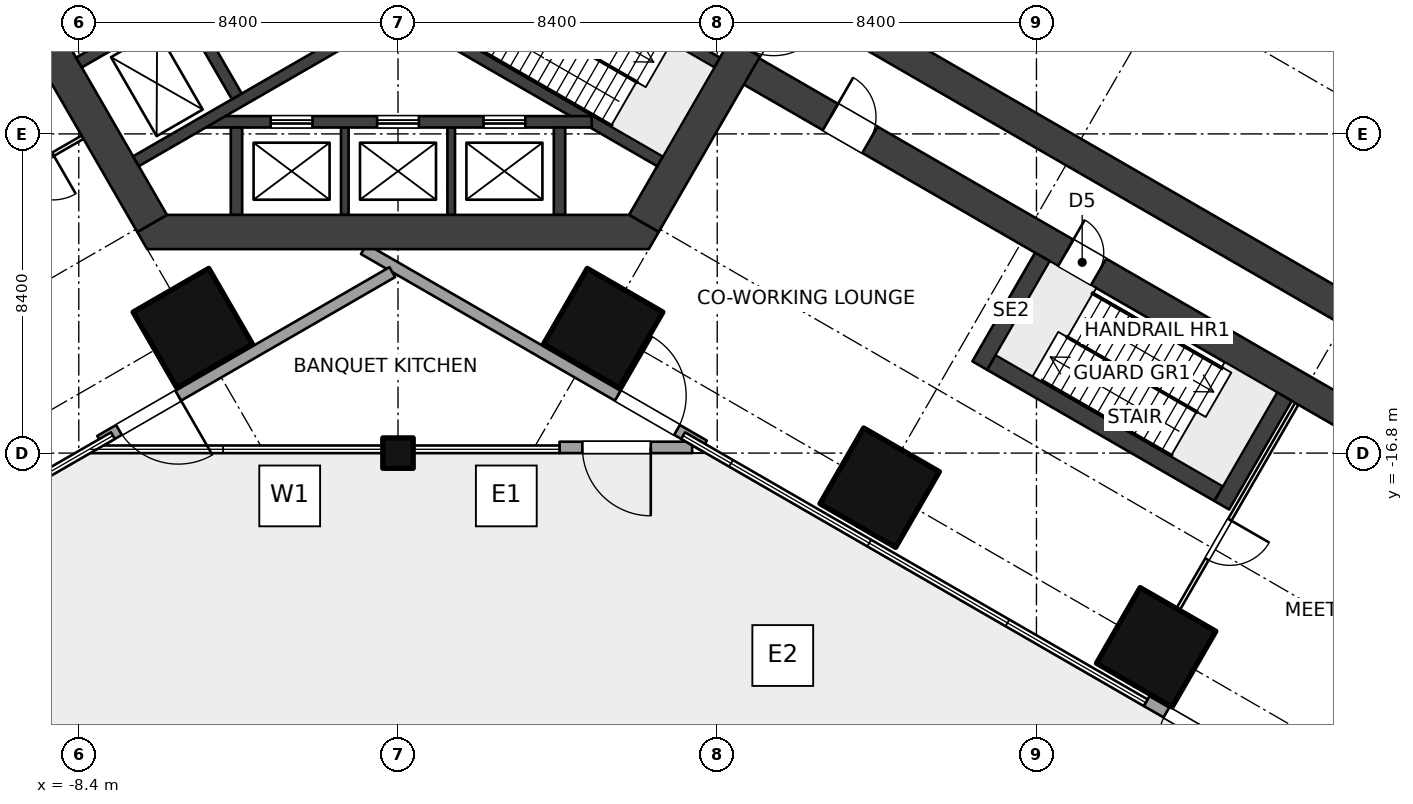
"""IFC4 building model, lengths in metres.
Left out: names, types, materials, properties, quantities, classifications, styles, units other than length and angle.
Written with IfcOpenShell. Run it as: python <this file> out.ifc"""

import sys

from ifc_helpers import new_model, si_unit, direction, frame, frame_2d, origin, origin_2d, place, context, subcontext, project, spatial, polyline, rectangle, outline, extrude, element, fill, save


model = new_model("IFC4")
c1 = context("Model", 3, precision=1e-05, world=origin(), true_north=direction((0.0, 1.0)))
c2 = subcontext(c1, "Body", "Model", "MODEL_VIEW")
j1 = project(units=[si_unit("LENGTHUNIT", "METRE"), si_unit("PLANEANGLEUNIT", "RADIAN")], contexts=[c1])
p1 = place(None, origin())
s1 = spatial("IfcSite", under=j1, at=p1, CompositionType="ELEMENT")
p2 = place(p1, origin())
s2 = spatial("IfcBuilding", under=s1, at=p2, CompositionType="ELEMENT")
p3 = place(p2, frame((0.0, 0.0, 16.0)))
s3 = spatial("IfcBuildingStorey", under=s2, at=p3, CompositionType="ELEMENT", Elevation=16.0)
for number, where, z_axis, x_axis in (
    (1, (-5.4, -13.51, 0.0), (0.0, 0.0, 1.0), (-0.5, 0.866, 0.0)),
    (2, (5.4, -13.51, 0.0), (0.0, 0.0, 1.0), (-0.5, -0.866, 0.0)),
    (3, (12.675, -17.71, 0.0), (0.0, 0.0, 1.0), (-0.5, -0.866, 0.0)),
    (4, (19.949, -21.91, 0.0), (0.0, 0.0, 1.0), (-0.5, -0.866, 0.0)),
):
    element("IfcColumn", number, at=place(p3, frame(where, z_axis=z_axis, x_axis=x_axis)), inside=s3, PredefinedType="COLUMN", context=c2, shape_type="SweptSolid", body=[
        extrude(rectangle(XDim=2.3, YDim=2.3, at=origin_2d()), origin(), (0.0, 0.0, 1.0), 5.0),
    ])
p4 = place(p3, frame((0.0, -16.8, 0.0), z_axis=(0.0, 0.0, 1.0), x_axis=(1.0, 0.0, 0.0)))
e5 = element("IfcColumn", 5, at=p4, inside=s3, PredefinedType="COLUMN", context=c2, shape_type="SweptSolid", body=[
    extrude(rectangle(XDim=0.8, YDim=0.8, at=origin_2d()), origin(), (0.0, 0.0, 1.0), 5.0),
])
p5 = place(p3, frame((-6.47, -10.757, 0.0), z_axis=(0.0, 0.0, 1.0), x_axis=(-0.499997612506, 0.8660267822, 0.0)))
e6 = element("IfcWall", 6, at=p5, inside=s3, PredefinedType="SHEAR", context=c2, shape_type="SweptSolid", body=[
    extrude(rectangle(XDim=12.161, YDim=0.9, at=frame_2d((6.08, 0.0))), origin(), (0.0, 0.0, 1.0), 5.0),
])
p6 = place(p5, frame((5.33, 0.0, 0.0)))
e7 = element("IfcOpeningElement", 7, at=p6, cuts=e6, PredefinedType="OPENING", context=c2, shape_type="SweptSolid", body=[
    extrude(rectangle(XDim=1.5, YDim=2.1, at=frame_2d((0.75, 1.05))), frame((0.0, 0.46, 0.0), z_axis=(0.0, -1.0, 0.0), x_axis=(1.0, 0.0, 0.0)), (0.0, 0.0, 1.0), 0.92),
])
p7 = place(p3, frame((12.551, -0.225, 0.0), z_axis=(0.0, 0.0, 1.0), x_axis=(-0.499997612506, -0.8660267822, 0.0)))
e8 = element("IfcWall", 8, at=p7, inside=s3, PredefinedType="SHEAR", context=c2, shape_type="SweptSolid", body=[
    extrude(rectangle(XDim=12.161, YDim=0.9, at=frame_2d((6.08, 0.0))), origin(), (0.0, 0.0, 1.0), 5.0),
])
p8 = place(p7, frame((5.33, 0.0, 0.0)))
e9 = element("IfcOpeningElement", 9, at=p8, cuts=e8, PredefinedType="OPENING", context=c2, shape_type="SweptSolid", body=[
    extrude(rectangle(XDim=1.5, YDim=2.1, at=frame_2d((0.75, 1.05))), frame((0.0, 0.46, 0.0), z_axis=(0.0, -1.0, 0.0), x_axis=(1.0, 0.0, 0.0)), (0.0, 0.0, 1.0), 0.92),
])
p9 = place(p3, origin())
e10 = element("IfcWall", 10, at=p9, inside=s3, PredefinedType="SHEAR", context=c2, shape_type="SweptSolid", body=[
    extrude(outline(polyline([(-6.6, -11.432), (6.6, -11.432), (6.86, -10.981), (6.08, -10.531), (-6.08, -10.531), (-6.86, -10.981), (-6.6, -11.432)])), origin(), (0.0, 0.0, 1.0), 5.0),
])
p10 = place(p3, frame((-2.419, -3.071, 0.0), z_axis=(0.0, 0.0, 1.0), x_axis=(-0.86602711848, -0.499997030048, 0.0)))
e11 = element("IfcWall", 11, at=p10, inside=s3, PredefinedType="SHEAR", context=c2, shape_type="SweptSolid", body=[
    extrude(rectangle(XDim=6.901, YDim=0.3, at=frame_2d((3.451, 0.0))), origin(), (0.0, 0.0, 1.0), 5.0),
])
p11 = place(p10, frame((4.85, 0.0, 0.0)))
e12 = element("IfcOpeningElement", 12, at=p11, cuts=e11, PredefinedType="OPENING", context=c2, shape_type="SweptSolid", body=[
    extrude(rectangle(XDim=1.1, YDim=2.1, at=frame_2d((0.55, 1.05))), frame((0.0, 0.16, 0.0), z_axis=(0.0, -1.0, 0.0), x_axis=(1.0, 0.0, 0.0)), (0.0, 0.0, 1.0), 0.32),
])
p12 = place(p3, frame((-0.919, -5.669, 0.0), z_axis=(0.0, 0.0, 1.0), x_axis=(-0.866011800373, -0.500023561059, 0.0)))
e13 = element("IfcWall", 13, at=p12, inside=s3, PredefinedType="SHEAR", context=c2, shape_type="SweptSolid", body=[
    extrude(rectangle(XDim=6.902, YDim=0.3, at=frame_2d((3.451, 0.0))), origin(), (0.0, 0.0, 1.0), 5.0),
])
p13 = place(p3, frame((-4.241, -7.414, 0.0), z_axis=(0.0, 0.0, 1.0), x_axis=(-0.500048589285, 0.86599734893, 0.0)))
e14 = element("IfcWall", 14, at=p13, inside=s3, PredefinedType="SHEAR", context=c2, shape_type="SweptSolid", body=[
    extrude(rectangle(XDim=2.7, YDim=0.3, at=frame_2d((1.35, 0.0))), origin(), (0.0, 0.0, 1.0), 5.0),
])
p14 = place(p3, frame((2.419, -3.071, 0.0), z_axis=(0.0, 0.0, 1.0), x_axis=(0.86602711848, -0.499997030048, 0.0)))
e15 = element("IfcWall", 15, at=p14, inside=s3, PredefinedType="SHEAR", context=c2, shape_type="SweptSolid", body=[
    extrude(rectangle(XDim=6.901, YDim=0.3, at=frame_2d((3.451, 0.0))), origin(), (0.0, 0.0, 1.0), 5.0),
])
p15 = place(p14, frame((0.25, 0.0, 0.0)))
e16 = element("IfcOpeningElement", 16, at=p15, cuts=e15, PredefinedType="OPENING", context=c2, shape_type="SweptSolid", body=[
    extrude(rectangle(XDim=1.0, YDim=2.1, at=frame_2d((0.5, 1.05))), frame((0.0, 0.16, 0.0), z_axis=(0.0, -1.0, 0.0), x_axis=(1.0, 0.0, 0.0)), (0.0, 0.0, 1.0), 0.32),
])
p16 = place(p3, frame((0.919, -5.669, 0.0), z_axis=(0.0, 0.0, 1.0), x_axis=(0.866011800373, -0.500023561059, 0.0)))
e17 = element("IfcWall", 17, at=p16, inside=s3, PredefinedType="SHEAR", context=c2, shape_type="SweptSolid", body=[
    extrude(rectangle(XDim=6.902, YDim=0.3, at=frame_2d((3.451, 0.0))), origin(), (0.0, 0.0, 1.0), 5.0),
])
p17 = place(p3, frame((5.098, -8.082, 0.0), z_axis=(0.0, 0.0, 1.0), x_axis=(-1.0, 0.0, 0.0)))
e18 = element("IfcWall", 18, at=p17, inside=s3, PredefinedType="SHEAR", context=c2, shape_type="SweptSolid", body=[
    extrude(rectangle(XDim=10.195, YDim=0.3, at=frame_2d((5.098, 0.0))), origin(), (0.0, 0.0, 1.0), 5.0),
])
p18 = place(p17, frame((1.748, 0.0, 0.0)))
e19 = element("IfcOpeningElement", 19, at=p18, cuts=e18, PredefinedType="OPENING", context=c2, shape_type="SweptSolid", body=[
    extrude(rectangle(XDim=1.1, YDim=2.1, at=frame_2d((0.55, 1.05))), frame((0.0, 0.16, 0.0), z_axis=(0.0, -1.0, 0.0), x_axis=(1.0, 0.0, 0.0)), (0.0, 0.0, 1.0), 0.32),
])
p19 = place(p17, frame((4.548, 0.0, 0.0)))
e20 = element("IfcOpeningElement", 20, at=p19, cuts=e18, PredefinedType="OPENING", context=c2, shape_type="SweptSolid", body=[
    extrude(rectangle(XDim=1.1, YDim=2.1, at=frame_2d((0.55, 1.05))), frame((0.0, 0.16, 0.0), z_axis=(0.0, -1.0, 0.0), x_axis=(1.0, 0.0, 0.0)), (0.0, 0.0, 1.0), 0.32),
])
p20 = place(p17, frame((7.348, 0.0, 0.0)))
e21 = element("IfcOpeningElement", 21, at=p20, cuts=e18, PredefinedType="OPENING", context=c2, shape_type="SweptSolid", body=[
    extrude(rectangle(XDim=1.1, YDim=2.1, at=frame_2d((0.55, 1.05))), frame((0.0, 0.16, 0.0), z_axis=(0.0, -1.0, 0.0), x_axis=(1.0, 0.0, 0.0)), (0.0, 0.0, 1.0), 0.32),
])
for number, where, z_axis, x_axis in (
    (22, (4.25, -8.231, 0.0), (0.0, 0.0, 1.0), (0.0, -1.0, 0.0)),
    (23, (-4.25, -8.231, 0.0), (0.0, 0.0, 1.0), (0.0, -1.0, 0.0)),
):
    element("IfcWall", number, at=place(p3, frame(where, z_axis=z_axis, x_axis=x_axis)), inside=s3, PredefinedType="SHEAR", context=c2, shape_type="SweptSolid", body=[
        extrude(rectangle(XDim=2.3, YDim=0.3, at=frame_2d((1.15, 0.0))), origin(), (0.0, 0.0, 1.0), 5.0),
    ])
for number, where, z_axis, x_axis in (
    (24, (1.4, -8.231, 0.0), (0.0, 0.0, 1.0), (0.0, -1.0, 0.0)),
    (25, (-1.4, -8.231, 0.0), (0.0, 0.0, 1.0), (0.0, -1.0, 0.0)),
):
    element("IfcWall", number, at=place(p3, frame(where, z_axis=z_axis, x_axis=x_axis)), inside=s3, PredefinedType="SHEAR", context=c2, shape_type="SweptSolid", body=[
        extrude(rectangle(XDim=2.3, YDim=0.2, at=frame_2d((1.15, 0.0))), origin(), (0.0, 0.0, 1.0), 5.0),
    ])
p21 = place(p3, frame((-8.91, -6.53, 0.0), z_axis=(0.0, 0.0, 1.0), x_axis=(-0.866025284237, -0.500000207062, 0.0)))
e26 = element("IfcWall", 26, at=p21, inside=s3, PredefinedType="SHEAR", context=c2, shape_type="SweptSolid", body=[
    extrude(rectangle(XDim=36.75, YDim=0.8, at=frame_2d((18.375, 0.0))), origin(), (0.0, 0.0, 1.0), 5.0),
])
p22 = place(p21, frame((1.35, 0.0, 0.0)))
e27 = element("IfcOpeningElement", 27, at=p22, cuts=e26, PredefinedType="OPENING", context=c2, shape_type="SweptSolid", body=[
    extrude(rectangle(XDim=1.2, YDim=2.1, at=frame_2d((0.6, 1.05))), frame((0.0, 0.41, 0.0), z_axis=(0.0, -1.0, 0.0), x_axis=(1.0, 0.0, 0.0)), (0.0, 0.0, 1.0), 0.82),
])
p23 = place(p3, frame((10.11, -4.451, 0.0), z_axis=(0.0, 0.0, 1.0), x_axis=(0.866025284237, -0.500000207062, 0.0)))
e28 = element("IfcWall", 28, at=p23, inside=s3, PredefinedType="SHEAR", context=c2, shape_type="SweptSolid", body=[
    extrude(rectangle(XDim=36.75, YDim=0.8, at=frame_2d((18.375, 0.0))), origin(), (0.0, 0.0, 1.0), 5.0),
])
p24 = place(p23, frame((1.35, 0.0, 0.0)))
e29 = element("IfcOpeningElement", 29, at=p24, cuts=e28, PredefinedType="OPENING", context=c2, shape_type="SweptSolid", body=[
    extrude(rectangle(XDim=1.2, YDim=2.1, at=frame_2d((0.6, 1.05))), frame((0.0, 0.41, 0.0), z_axis=(0.0, -1.0, 0.0), x_axis=(1.0, 0.0, 0.0)), (0.0, 0.0, 1.0), 0.82),
])
p25 = place(p3, frame((8.91, -6.53, 0.0), z_axis=(0.0, 0.0, 1.0), x_axis=(0.866025284237, -0.500000207062, 0.0)))
e30 = element("IfcWall", 30, at=p25, inside=s3, PredefinedType="SHEAR", context=c2, shape_type="SweptSolid", body=[
    extrude(rectangle(XDim=36.75, YDim=0.8, at=frame_2d((18.375, 0.0))), origin(), (0.0, 0.0, 1.0), 5.0),
])
p26 = place(p25, frame((10.0, 0.0, 0.0)))
e31 = element("IfcOpeningElement", 31, at=p26, cuts=e30, PredefinedType="OPENING", context=c2, shape_type="SweptSolid", body=[
    extrude(rectangle(XDim=1.0, YDim=2.1, at=frame_2d((0.5, 1.05))), frame((0.0, 0.41, 0.0), z_axis=(0.0, -1.0, 0.0), x_axis=(1.0, 0.0, 0.0)), (0.0, 0.0, 1.0), 0.82),
])
p27 = place(p25, frame((2.85, 0.0, 0.0)))
e32 = element("IfcOpeningElement", 32, at=p27, cuts=e30, PredefinedType="OPENING", context=c2, shape_type="SweptSolid", body=[
    extrude(rectangle(XDim=1.2, YDim=2.1, at=frame_2d((0.6, 1.05))), frame((0.0, 0.41, 0.0), z_axis=(0.0, -1.0, 0.0), x_axis=(1.0, 0.0, 0.0)), (0.0, 0.0, 1.0), 0.82),
])
p28 = place(p3, frame((22.298, -24.825, 0.0), z_axis=(0.0, 0.0, 1.0), x_axis=(-0.866031096941, 0.499990139034, 0.0)))
e33 = element("IfcWall", 33, at=p28, inside=s3, PredefinedType="SOLIDWALL", context=c2, shape_type="SweptSolid", body=[
    extrude(rectangle(XDim=3.0, YDim=0.3, at=frame_2d((1.5, 0.0))), origin(), (0.0, 0.0, 1.0), 4.7),
])
p29 = place(p28, frame((0.6, 0.0, 0.0)))
e34 = element("IfcOpeningElement", 34, at=p29, cuts=e33, PredefinedType="OPENING", context=c2, shape_type="SweptSolid", body=[
    extrude(rectangle(XDim=1.8, YDim=2.4, at=frame_2d((0.9, 1.2))), frame((0.0, 0.16, 0.0), z_axis=(0.0, -1.0, 0.0), x_axis=(1.0, 0.0, 0.0)), (0.0, 0.0, 1.0), 0.32),
])
p30 = place(p3, frame((7.741, -16.65, 0.0), z_axis=(0.0, 0.0, 1.0), x_axis=(-1.0, 0.0, 0.0)))
e35 = element("IfcWall", 35, at=p30, inside=s3, PredefinedType="SOLIDWALL", context=c2, shape_type="SweptSolid", body=[
    extrude(rectangle(XDim=3.49, YDim=0.3, at=frame_2d((1.745, 0.0))), origin(), (0.0, 0.0, 1.0), 4.7),
])
p31 = place(p30, frame((1.089, 0.0, 0.0)))
e36 = element("IfcOpeningElement", 36, at=p31, cuts=e35, PredefinedType="OPENING", context=c2, shape_type="SweptSolid", body=[
    extrude(rectangle(XDim=1.8, YDim=2.4, at=frame_2d((0.9, 1.2))), frame((0.0, 0.16, 0.0), z_axis=(0.0, -1.0, 0.0), x_axis=(1.0, 0.0, 0.0)), (0.0, 0.0, 1.0), 0.32),
])
p32 = place(p3, frame((-8.3, -8.487, 0.0), z_axis=(0.0, 0.0, 1.0), x_axis=(-0.866034573852, -0.49998411664, 0.0)))
e37 = element("IfcWall", 37, at=p32, inside=s3, PredefinedType="PARTITIONING", context=c2, shape_type="SweptSolid", body=[
    extrude(rectangle(XDim=2.8, YDim=0.1, at=frame_2d((1.4, 0.0))), origin(), (0.0, 0.0, 1.0), 4.7),
])
p33 = place(p32, frame((0.9, 0.0, 0.0)))
e38 = element("IfcOpeningElement", 38, at=p33, cuts=e37, PredefinedType="OPENING", context=c2, shape_type="SweptSolid", body=[
    extrude(rectangle(XDim=1.2, YDim=2.1, at=frame_2d((0.6, 1.05))), frame((0.0, 0.06, 0.0), z_axis=(0.0, -1.0, 0.0), x_axis=(1.0, 0.0, 0.0)), (0.0, 0.0, 1.0), 0.12),
])
p34 = place(p3, frame((23.649, -15.501, 0.0), z_axis=(0.0, 0.0, 1.0), x_axis=(-0.500004234368, -0.866022959057, 0.0)))
e39 = element("IfcWall", 39, at=p34, inside=s3, PredefinedType="PARTITIONING", context=c2, shape_type="SweptSolid", body=[
    extrude(rectangle(XDim=6.25, YDim=0.1, at=frame_2d((3.125, 0.0))), origin(), (0.0, 0.0, 1.0), 2.9),
])
p35 = place(p34, frame((3.525, 0.0, 0.0)))
e40 = element("IfcOpeningElement", 40, at=p35, cuts=e39, PredefinedType="OPENING", context=c2, shape_type="SweptSolid", body=[
    extrude(rectangle(XDim=1.2, YDim=2.1, at=frame_2d((0.6, 1.05))), frame((0.0, 0.06, 0.0), z_axis=(0.0, -1.0, 0.0), x_axis=(1.0, 0.0, 0.0)), (0.0, 0.0, 1.0), 0.12),
])
p36 = place(p3, frame((-0.15, -12.038, 0.0), z_axis=(0.0, 0.0, 1.0), x_axis=(-0.866033104117, -0.499986662396, 0.0)))
e41 = element("IfcWall", 41, at=p36, inside=s3, PredefinedType="SOLIDWALL", context=c2, shape_type="SweptSolid", body=[
    extrude(rectangle(XDim=8.879, YDim=0.3, at=frame_2d((4.439, 0.0))), origin(), (0.0, 0.0, 1.0), 4.7),
])
p37 = place(p36, frame((6.504, 0.0, 0.0)))
e42 = element("IfcOpeningElement", 42, at=p37, cuts=e41, PredefinedType="OPENING", context=c2, shape_type="SweptSolid", body=[
    extrude(rectangle(XDim=1.8, YDim=2.4, at=frame_2d((0.9, 1.2))), frame((0.0, 0.16, 0.0), z_axis=(0.0, -1.0, 0.0), x_axis=(1.0, 0.0, 0.0)), (0.0, 0.0, 1.0), 0.32),
])
p38 = place(p3, frame((9.45, 6.495, 0.0), z_axis=(0.0, 0.0, 1.0), x_axis=(0.866025301493, -0.500000177174, 0.0)))
e43 = element("IfcWall", 43, at=p38, inside=s3, PredefinedType="SOLIDWALL", context=c2, shape_type="SweptSolid", body=[
    extrude(rectangle(XDim=43.095, YDim=0.3, at=frame_2d((21.548, 0.0))), origin(), (0.0, 0.0, 1.0), 4.7),
])
p39 = place(p38, frame((26.595, 0.0, 0.0)))
e44 = element("IfcOpeningElement", 44, at=p39, cuts=e43, PredefinedType="OPENING", context=c2, shape_type="SweptSolid", body=[
    extrude(rectangle(XDim=1.8, YDim=2.4, at=frame_2d((0.9, 1.2))), frame((0.0, 0.16, 0.0), z_axis=(0.0, -1.0, 0.0), x_axis=(1.0, 0.0, 0.0)), (0.0, 0.0, 1.0), 0.32),
])
p40 = place(p3, frame((-0.9, -11.432, 0.0), z_axis=(0.0, 0.0, 1.0), x_axis=(0.866022359356, -0.500005273068, 0.0)))
e45 = element("IfcWall", 45, at=p40, inside=s3, PredefinedType="SOLIDWALL", context=c2, shape_type="SweptSolid", body=[
    extrude(rectangle(XDim=10.337, YDim=0.3, at=frame_2d((5.168, 0.0))), origin(), (0.0, 0.0, 1.0), 4.7),
])
p41 = place(p40, frame((7.717, 0.0, 0.0)))
e46 = element("IfcOpeningElement", 46, at=p41, cuts=e45, PredefinedType="OPENING", context=c2, shape_type="SweptSolid", body=[
    extrude(rectangle(XDim=1.8, YDim=2.4, at=frame_2d((0.9, 1.2))), frame((0.0, 0.16, 0.0), z_axis=(0.0, -1.0, 0.0), x_axis=(1.0, 0.0, 0.0)), (0.0, 0.0, 1.0), 0.32),
])
for number, where, z_axis, x_axis in (
    (47, (16.959, -11.639, 0.0), (0.0, 0.0, 1.0), (-0.5, -0.866, 0.0)),
    (48, (23.324, -15.314, 0.0), (0.0, 0.0, 1.0), (-0.5, -0.866, 0.0)),
):
    element("IfcWall", number, at=place(p3, frame(where, z_axis=z_axis, x_axis=x_axis)), inside=s3, PredefinedType="SOLIDWALL", context=c2, shape_type="SweptSolid", body=[
        extrude(rectangle(XDim=3.3, YDim=0.45, at=frame_2d((1.65, 0.0))), origin(), (0.0, 0.0, 1.0), 5.0),
    ])
p42 = place(p3, frame((15.616, -14.415, 0.0), z_axis=(0.0, 0.0, 1.0), x_axis=(0.866028853923, -0.499994024137, 0.0)))
e49 = element("IfcWall", 49, at=p42, inside=s3, PredefinedType="SOLIDWALL", context=c2, shape_type="SweptSolid", body=[
    extrude(rectangle(XDim=6.9, YDim=0.45, at=frame_2d((3.45, 0.0))), origin(), (0.0, 0.0, 1.0), 5.0),
])
p43 = place(p29, origin())
e50 = element("IfcDoor", 50, at=p43, inside=s3, OperationType="DOUBLE_DOOR_SINGLE_SWING", PredefinedType="DOOR", context=c2, shape_type="SweptSolid", body=[
    extrude(rectangle(XDim=1.8, YDim=2.4, at=frame_2d((0.9, 1.2))), frame((0.0, 0.025, 0.0), z_axis=(0.0, -1.0, 0.0), x_axis=(1.0, 0.0, 0.0)), (0.0, 0.0, 1.0), 0.05),
])
fill(e34, e50)
p44 = place(p31, origin())
e51 = element("IfcDoor", 51, at=p44, inside=s3, OperationType="DOUBLE_DOOR_SINGLE_SWING", PredefinedType="DOOR", context=c2, shape_type="SweptSolid", body=[
    extrude(rectangle(XDim=1.8, YDim=2.4, at=frame_2d((0.9, 1.2))), frame((0.0, 0.025, 0.0), z_axis=(0.0, -1.0, 0.0), x_axis=(1.0, 0.0, 0.0)), (0.0, 0.0, 1.0), 0.05),
])
fill(e36, e51)
p45 = place(p18, origin())
e52 = element("IfcDoor", 52, at=p45, inside=s3, OperationType="DOUBLE_DOOR_SLIDING", PredefinedType="DOOR", context=c2, shape_type="SweptSolid", body=[
    extrude(rectangle(XDim=1.1, YDim=2.1, at=frame_2d((0.55, 1.05))), frame((0.0, 0.025, 0.0), z_axis=(0.0, -1.0, 0.0), x_axis=(1.0, 0.0, 0.0)), (0.0, 0.0, 1.0), 0.05),
])
fill(e19, e52)
p46 = place(p19, origin())
e53 = element("IfcDoor", 53, at=p46, inside=s3, OperationType="DOUBLE_DOOR_SLIDING", PredefinedType="DOOR", context=c2, shape_type="SweptSolid", body=[
    extrude(rectangle(XDim=1.1, YDim=2.1, at=frame_2d((0.55, 1.05))), frame((0.0, 0.025, 0.0), z_axis=(0.0, -1.0, 0.0), x_axis=(1.0, 0.0, 0.0)), (0.0, 0.0, 1.0), 0.05),
])
fill(e20, e53)
p47 = place(p20, origin())
e54 = element("IfcDoor", 54, at=p47, inside=s3, OperationType="DOUBLE_DOOR_SLIDING", PredefinedType="DOOR", context=c2, shape_type="SweptSolid", body=[
    extrude(rectangle(XDim=1.1, YDim=2.1, at=frame_2d((0.55, 1.05))), frame((0.0, 0.025, 0.0), z_axis=(0.0, -1.0, 0.0), x_axis=(1.0, 0.0, 0.0)), (0.0, 0.0, 1.0), 0.05),
])
fill(e21, e54)
p48 = place(p33, origin())
e55 = element("IfcDoor", 55, at=p48, inside=s3, OperationType="DOUBLE_SWING_LEFT", PredefinedType="DOOR", context=c2, shape_type="SweptSolid", body=[
    extrude(rectangle(XDim=1.2, YDim=2.1, at=frame_2d((0.6, 1.05))), frame((0.0, 0.025, 0.0), z_axis=(0.0, -1.0, 0.0), x_axis=(1.0, 0.0, 0.0)), (0.0, 0.0, 1.0), 0.05),
])
fill(e38, e55)
p49 = place(p26, origin())
e56 = element("IfcDoor", 56, at=p49, inside=s3, OperationType="SINGLE_SWING_LEFT", PredefinedType="DOOR", context=c2, shape_type="SweptSolid", body=[
    extrude(rectangle(XDim=1.0, YDim=2.1, at=frame_2d((0.5, 1.05))), frame((0.0, 0.025, 0.0), z_axis=(0.0, -1.0, 0.0), x_axis=(1.0, 0.0, 0.0)), (0.0, 0.0, 1.0), 0.05),
])
fill(e31, e56)
p50 = place(p35, origin())
e57 = element("IfcDoor", 57, at=p50, inside=s3, OperationType="DOUBLE_SWING_LEFT", PredefinedType="DOOR", context=c2, shape_type="SweptSolid", body=[
    extrude(rectangle(XDim=1.2, YDim=2.1, at=frame_2d((0.6, 1.05))), frame((0.0, 0.025, 0.0), z_axis=(0.0, -1.0, 0.0), x_axis=(1.0, 0.0, 0.0)), (0.0, 0.0, 1.0), 0.05),
])
fill(e40, e57)
p51 = place(p27, origin())
e58 = element("IfcDoor", 58, at=p51, inside=s3, OperationType="DOUBLE_SWING_LEFT", PredefinedType="DOOR", context=c2, shape_type="SweptSolid", body=[
    extrude(rectangle(XDim=1.2, YDim=2.1, at=frame_2d((0.6, 1.05))), frame((0.0, 0.025, 0.0), z_axis=(0.0, -1.0, 0.0), x_axis=(1.0, 0.0, 0.0)), (0.0, 0.0, 1.0), 0.05),
])
fill(e32, e58)
p52 = place(p37, origin())
e59 = element("IfcDoor", 59, at=p52, inside=s3, OperationType="DOUBLE_DOOR_DOUBLE_SWING", PredefinedType="DOOR", context=c2, shape_type="SweptSolid", body=[
    extrude(rectangle(XDim=1.8, YDim=2.4, at=frame_2d((0.9, 1.2))), frame((0.0, 0.025, 0.0), z_axis=(0.0, -1.0, 0.0), x_axis=(1.0, 0.0, 0.0)), (0.0, 0.0, 1.0), 0.05),
])
fill(e42, e59)
p53 = place(p41, origin())
e60 = element("IfcDoor", 60, at=p53, inside=s3, OperationType="DOUBLE_DOOR_DOUBLE_SWING", PredefinedType="DOOR", context=c2, shape_type="SweptSolid", body=[
    extrude(rectangle(XDim=1.8, YDim=2.4, at=frame_2d((0.9, 1.2))), frame((0.0, 0.025, 0.0), z_axis=(0.0, -1.0, 0.0), x_axis=(1.0, 0.0, 0.0)), (0.0, 0.0, 1.0), 0.05),
])
fill(e46, e60)
save(model, sys.argv[1])
